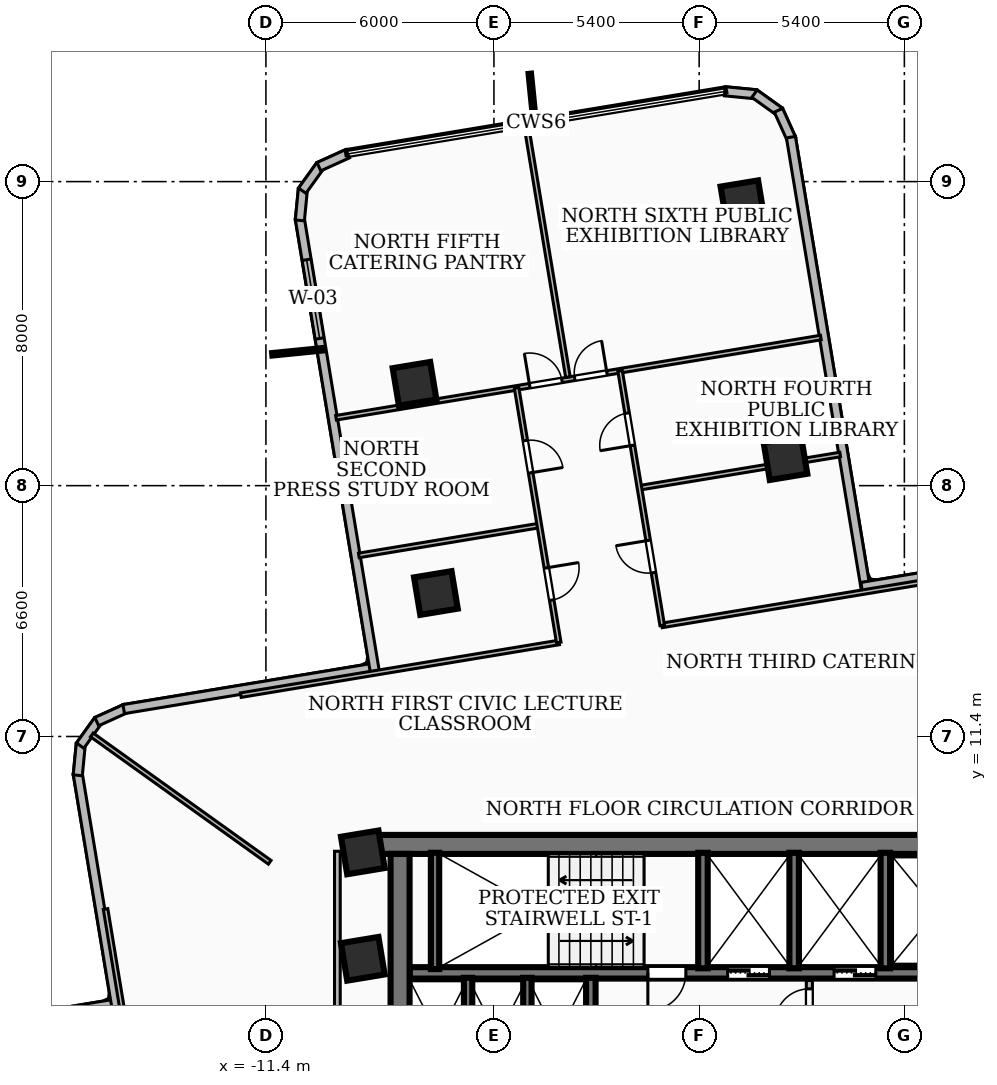
"""IFC4 building model, lengths in metres.
Left out: names, types, materials, properties, quantities, classifications, styles, units other than length and angle.
Written with IfcOpenShell. Run it as: python <this file> out.ifc"""

import sys

from ifc_helpers import new_model, si_unit, direction, frame, frame_2d, origin, origin_2d, place, context, subcontext, project, spatial, rectangle, extrude, element, fill, save


model = new_model("IFC4")
c1 = context("Model", 3, precision=1e-05, world=origin(), true_north=direction((0.0, 1.0)))
c2 = subcontext(c1, "Body", "Model", "MODEL_VIEW")
j1 = project(units=[si_unit("LENGTHUNIT", "METRE"), si_unit("PLANEANGLEUNIT", "RADIAN")], contexts=[c1])
p1 = place(None, origin())
s1 = spatial("IfcSite", under=j1, at=p1, CompositionType="ELEMENT")
p2 = place(p1, origin())
s2 = spatial("IfcBuilding", under=s1, at=p2, CompositionType="ELEMENT")
p3 = place(p2, frame((0.0, 0.0, 96.48)))
s3 = spatial("IfcBuildingStorey", under=s2, at=p3, CompositionType="ELEMENT", Elevation=96.48)
p4 = place(p3, frame((-8.78, 8.56, 0.0), z_axis=(0.0, 0.0, 1.0), x_axis=(1.0, 0.0, 0.0)))
e1 = element("IfcWall", 1, at=p4, inside=s3, PredefinedType="SHEAR", context=c2, shape_type="SweptSolid", body=[
    extrude(rectangle(XDim=17.56, YDim=0.5, at=frame_2d((8.78, 0.0))), origin(), (0.0, 0.0, 1.0), 3.34),
])
p5 = place(p3, frame((-7.87, 2.0, 0.0), z_axis=(0.0, 0.0, 1.0), x_axis=(0.0, 1.0, 0.0)))
e2 = element("IfcWall", 2, at=p5, inside=s3, PredefinedType="SHEAR", context=c2, shape_type="SweptSolid", body=[
    extrude(rectangle(XDim=6.31, YDim=0.5, at=frame_2d((3.155, 0.0))), origin(), (0.0, 0.0, 1.0), 3.34),
])
p6 = place(p3, frame((7.62, 5.18, 0.0), z_axis=(0.0, 0.0, 1.0), x_axis=(-1.0, 0.0, 0.0)))
e3 = element("IfcWall", 3, at=p6, inside=s3, PredefinedType="SOLIDWALL", context=c2, shape_type="SweptSolid", body=[
    extrude(rectangle(XDim=15.24, YDim=0.3, at=frame_2d((7.62, 0.0))), origin(), (0.0, 0.0, 1.0), 3.34),
])
p7 = place(p6, frame((5.77, 0.0, 0.0)))
e4 = element("IfcOpeningElement", 4, at=p7, cuts=e3, PredefinedType="OPENING", context=c2, shape_type="SweptSolid", body=[
    extrude(rectangle(XDim=1.1, YDim=2.15, at=frame_2d((0.55, 1.075))), frame((0.0, 0.16, 0.0), z_axis=(0.0, -1.0, 0.0), x_axis=(1.0, 0.0, 0.0)), (0.0, 0.0, 1.0), 0.32),
])
p8 = place(p6, frame((2.97, 0.0, 0.0)))
e5 = element("IfcOpeningElement", 5, at=p8, cuts=e3, PredefinedType="OPENING", context=c2, shape_type="SweptSolid", body=[
    extrude(rectangle(XDim=1.1, YDim=2.15, at=frame_2d((0.55, 1.075))), frame((0.0, 0.16, 0.0), z_axis=(0.0, -1.0, 0.0), x_axis=(1.0, 0.0, 0.0)), (0.0, 0.0, 1.0), 0.32),
])
p9 = place(p6, frame((7.97, 0.0, 0.0)))
e6 = element("IfcOpeningElement", 6, at=p9, cuts=e3, PredefinedType="OPENING", context=c2, shape_type="SweptSolid", body=[
    extrude(rectangle(XDim=1.0, YDim=2.1, at=frame_2d((0.5, 1.05))), frame((0.0, 0.16, 0.0), z_axis=(0.0, -1.0, 0.0), x_axis=(1.0, 0.0, 0.0)), (0.0, 0.0, 1.0), 0.32),
])
p10 = place(p3, frame((-6.95, 5.28, 0.0), z_axis=(0.0, 0.0, 1.0), x_axis=(0.0, 1.0, 0.0)))
e7 = element("IfcWall", 7, at=p10, inside=s3, PredefinedType="SOLIDWALL", context=c2, shape_type="SweptSolid", body=[
    extrude(rectangle(XDim=3.06, YDim=0.22, at=frame_2d((1.53, 0.0))), origin(), (0.0, 0.0, 1.0), 3.34),
])
for number, where, z_axis, x_axis in (
    (8, (0.1, 5.3, 0.0), (0.0, 0.0, 1.0), (0.0, 1.0, 0.0)),
    (9, (2.5, 5.3, 0.0), (0.0, 0.0, 1.0), (0.0, 1.0, 0.0)),
    (10, (4.9, 5.3, 0.0), (0.0, 0.0, 1.0), (0.0, 1.0, 0.0)),
):
    element("IfcWall", number, at=place(p3, frame(where, z_axis=z_axis, x_axis=x_axis)), inside=s3, PredefinedType="SOLIDWALL", context=c2, shape_type="SweptSolid", body=[
        extrude(rectangle(XDim=3.04, YDim=0.25, at=frame_2d((1.52, 0.0))), origin(), (0.0, 0.0, 1.0), 3.34),
    ])
p11 = place(p3, frame((-2.85, 1.98, 0.0), z_axis=(0.0, 0.0, 1.0), x_axis=(0.0, 1.0, 0.0)))
e11 = element("IfcWall", 11, at=p11, inside=s3, PredefinedType="SOLIDWALL", context=c2, shape_type="SweptSolid", body=[
    extrude(rectangle(XDim=3.07, YDim=0.25, at=frame_2d((1.535, 0.0))), origin(), (0.0, 0.0, 1.0), 3.34),
])
for number, where, z_axis, x_axis in (
    (12, (-6.08, 1.98, 0.0), (0.0, 0.0, 1.0), (0.0, 1.0, 0.0)),
    (13, (-4.52, 1.98, 0.0), (0.0, 0.0, 1.0), (0.0, 1.0, 0.0)),
):
    element("IfcWall", number, at=place(p3, frame(where, z_axis=z_axis, x_axis=x_axis)), inside=s3, PredefinedType="SOLIDWALL", context=c2, shape_type="SweptSolid", body=[
        extrude(rectangle(XDim=3.07, YDim=0.22, at=frame_2d((1.535, 0.0))), origin(), (0.0, 0.0, 1.0), 3.34),
    ])
for number, where, z_axis, x_axis in (
    (14, (-8.85, 5.55, 0.0), (0.0, 0.0, 1.0), (0.987, 0.163, 0.0)),
    (15, (-8.85, 8.35, 0.0), (0.0, 0.0, 1.0), (0.987, 0.163, 0.0)),
    (16, (2.271, 18.724, 0.0), (0.0, 0.0, 1.0), (0.987, 0.163, 0.0)),
    (17, (-6.927, 15.175, 0.0), (0.0, 0.0, 1.0), (0.987, 0.163, 0.0)),
    (18, (1.139, 25.457, 0.0), (0.0, 0.0, 1.0), (0.987, 0.163, 0.0)),
    (19, (-7.489, 20.679, 0.0), (0.0, 0.0, 1.0), (0.987, 0.163, 0.0)),
):
    element("IfcColumn", number, at=place(p3, frame(where, z_axis=z_axis, x_axis=x_axis)), inside=s3, PredefinedType="COLUMN", context=c2, shape_type="SweptSolid", body=[
        extrude(rectangle(XDim=1.0, YDim=1.0, at=origin_2d()), origin(), (0.0, 0.0, 1.0), 3.6),
    ])
p12 = place(p3, frame((-31.312, 1.729, 0.0), z_axis=(0.0, 0.0, 1.0), x_axis=(0.986572947557, 0.163321214629, 0.0)))
e20 = element("IfcWall", 20, at=p12, inside=s3, PredefinedType="SOLIDWALL", context=c2, shape_type="SweptSolid", body=[
    extrude(rectangle(XDim=16.274, YDim=0.24, at=frame_2d((8.137, 0.0))), origin(), (0.0, 0.0, 1.0), 3.34),
])
p13 = place(p12, frame((1.1, 0.0, 0.85)))
e21 = element("IfcOpeningElement", 21, at=p13, cuts=e20, PredefinedType="OPENING", context=c2, shape_type="SweptSolid", body=[
    extrude(rectangle(XDim=2.1, YDim=1.8, at=frame_2d((1.05, 0.9))), frame((0.0, 0.13, 0.0), z_axis=(0.0, -1.0, 0.0), x_axis=(1.0, 0.0, 0.0)), (0.0, 0.0, 1.0), 0.26),
])
p14 = place(p3, frame((-15.335, 4.276, 0.0), z_axis=(0.0, 0.0, 1.0), x_axis=(-0.16323720082, 0.986586851863, 0.0)))
e22 = element("IfcWall", 22, at=p14, inside=s3, PredefinedType="SOLIDWALL", context=c2, shape_type="SweptSolid", body=[
    extrude(rectangle(XDim=6.237, YDim=0.24, at=frame_2d((3.118, 0.0))), origin(), (0.0, 0.0, 1.0), 3.34),
])
p15 = place(p3, frame((-16.351, 10.379, 0.0), z_axis=(0.0, 0.0, 1.0), x_axis=(0.096474594184, 0.995335447313, 0.0)))
e23 = element("IfcWall", 23, at=p15, inside=s3, PredefinedType="SOLIDWALL", context=c2, shape_type="SweptSolid", body=[
    extrude(rectangle(XDim=0.83, YDim=0.24, at=frame_2d((0.415, 0.0))), origin(), (0.0, 0.0, 1.0), 3.34),
])
p16 = place(p3, frame((-16.288, 11.16, 0.0), z_axis=(0.0, 0.0, 1.0), x_axis=(0.583561896965, 0.812068662375, 0.0)))
e24 = element("IfcWall", 24, at=p16, inside=s3, PredefinedType="SOLIDWALL", context=c2, shape_type="SweptSolid", body=[
    extrude(rectangle(XDim=0.814, YDim=0.24, at=frame_2d((0.407, 0.0))), origin(), (0.0, 0.0, 1.0), 3.34),
])
p17 = place(p3, frame((-15.851, 11.791, 0.0), z_axis=(0.0, 0.0, 1.0), x_axis=(0.910868773958, 0.412696106872, 0.0)))
e25 = element("IfcWall", 25, at=p17, inside=s3, PredefinedType="SOLIDWALL", context=c2, shape_type="SweptSolid", body=[
    extrude(rectangle(XDim=0.831, YDim=0.24, at=frame_2d((0.416, 0.0))), origin(), (0.0, 0.0, 1.0), 3.34),
])
p18 = place(p3, frame((-15.142, 12.12, 0.0), z_axis=(0.0, 0.0, 1.0), x_axis=(0.986586085056, 0.163241835244, 0.0)))
e26 = element("IfcWall", 26, at=p18, inside=s3, PredefinedType="SOLIDWALL", context=c2, shape_type="SweptSolid", body=[
    extrude(rectangle(XDim=6.775, YDim=0.24, at=frame_2d((3.387, 0.0))), origin(), (0.0, 0.0, 1.0), 3.34),
])
p19 = place(p3, frame((-8.537, 13.115, 0.0), z_axis=(0.0, 0.0, 1.0), x_axis=(-0.163290786455, 0.986577984276, 0.0)))
e27 = element("IfcWall", 27, at=p19, inside=s3, PredefinedType="SOLIDWALL", context=c2, shape_type="SweptSolid", body=[
    extrude(rectangle(XDim=12.076, YDim=0.24, at=frame_2d((6.038, 0.0))), origin(), (0.0, 0.0, 1.0), 3.34),
])
p20 = place(p19, frame((8.876, 0.0, 0.85)))
e28 = element("IfcOpeningElement", 28, at=p20, cuts=e27, PredefinedType="OPENING", context=c2, shape_type="SweptSolid", body=[
    extrude(rectangle(XDim=2.1, YDim=2.0, at=frame_2d((1.05, 1.0))), frame((0.0, 0.13, 0.0), z_axis=(0.0, -1.0, 0.0), x_axis=(1.0, 0.0, 0.0)), (0.0, 0.0, 1.0), 0.26),
])
p21 = place(p3, frame((-10.507, 24.979, 0.0), z_axis=(0.0, 0.0, 1.0), x_axis=(0.096389937095, 0.995343649212, 0.0)))
e29 = element("IfcWall", 29, at=p21, inside=s3, PredefinedType="SOLIDWALL", context=c2, shape_type="SweptSolid", body=[
    extrude(rectangle(XDim=0.831, YDim=0.24, at=frame_2d((0.416, 0.0))), origin(), (0.0, 0.0, 1.0), 3.34),
])
p22 = place(p3, frame((-10.444, 25.761, 0.0), z_axis=(0.0, 0.0, 1.0), x_axis=(0.583561896965, 0.812068662375, 0.0)))
e30 = element("IfcWall", 30, at=p22, inside=s3, PredefinedType="SOLIDWALL", context=c2, shape_type="SweptSolid", body=[
    extrude(rectangle(XDim=0.814, YDim=0.24, at=frame_2d((0.407, 0.0))), origin(), (0.0, 0.0, 1.0), 3.34),
])
p23 = place(p3, frame((-10.007, 26.392, 0.0), z_axis=(0.0, 0.0, 1.0), x_axis=(0.91142038271, 0.41147647075, 0.0)))
e31 = element("IfcWall", 31, at=p23, inside=s3, PredefinedType="SOLIDWALL", context=c2, shape_type="SweptSolid", body=[
    extrude(rectangle(XDim=0.831, YDim=0.24, at=frame_2d((0.415, 0.0))), origin(), (0.0, 0.0, 1.0), 3.34),
])
p24 = place(p3, frame((0.674, 28.377, 0.0), z_axis=(0.0, 0.0, 1.0), x_axis=(0.99537180181, -0.096098783346, 0.0)))
e32 = element("IfcWall", 32, at=p24, inside=s3, PredefinedType="SOLIDWALL", context=c2, shape_type="SweptSolid", body=[
    extrude(rectangle(XDim=0.831, YDim=0.24, at=frame_2d((0.416, 0.0))), origin(), (0.0, 0.0, 1.0), 3.34),
])
p25 = place(p3, frame((1.456, 28.314, 0.0), z_axis=(0.0, 0.0, 1.0), x_axis=(0.812108665246, -0.583506226045, 0.0)))
e33 = element("IfcWall", 33, at=p25, inside=s3, PredefinedType="SOLIDWALL", context=c2, shape_type="SweptSolid", body=[
    extrude(rectangle(XDim=0.814, YDim=0.24, at=frame_2d((0.407, 0.0))), origin(), (0.0, 0.0, 1.0), 3.34),
])
p26 = place(p3, frame((2.087, 27.877, 0.0), z_axis=(0.0, 0.0, 1.0), x_axis=(0.412272558088, -0.91106055663, 0.0)))
e34 = element("IfcWall", 34, at=p26, inside=s3, PredefinedType="SOLIDWALL", context=c2, shape_type="SweptSolid", body=[
    extrude(rectangle(XDim=0.83, YDim=0.24, at=frame_2d((0.415, 0.0))), origin(), (0.0, 0.0, 1.0), 3.34),
])
p27 = place(p3, frame((2.415, 27.169, 0.0), z_axis=(0.0, 0.0, 1.0), x_axis=(0.163307072567, -0.986575288587, 0.0)))
e35 = element("IfcWall", 35, at=p27, inside=s3, PredefinedType="SOLIDWALL", context=c2, shape_type="SweptSolid", body=[
    extrude(rectangle(XDim=12.075, YDim=0.24, at=frame_2d((6.038, 0.0))), origin(), (0.0, 0.0, 1.0), 2.486),
])
p28 = place(p3, frame((4.276, 15.335, 0.0), z_axis=(0.0, 0.0, 1.0), x_axis=(0.986586851863, 0.16323720082, 0.0)))
e36 = element("IfcWall", 36, at=p28, inside=s3, PredefinedType="SOLIDWALL", context=c2, shape_type="SweptSolid", body=[
    extrude(rectangle(XDim=6.237, YDim=0.24, at=frame_2d((3.118, 0.0))), origin(), (0.0, 0.0, 1.0), 2.486),
])
p29 = place(p3, frame((2.9, 2.04, 0.0), z_axis=(0.0, 0.0, 1.0), x_axis=(0.0, 1.0, 0.0)))
e37 = element("IfcWall", 37, at=p29, inside=s3, PredefinedType="PARTITIONING", context=c2, shape_type="SweptSolid", body=[
    extrude(rectangle(XDim=2.94, YDim=0.16, at=frame_2d((1.47, 0.0))), origin(), (0.0, 0.0, 1.0), 2.405),
])
p30 = place(p29, frame((1.82, 0.0, 0.0)))
e38 = element("IfcOpeningElement", 38, at=p30, cuts=e37, PredefinedType="OPENING", context=c2, shape_type="SweptSolid", body=[
    extrude(rectangle(XDim=0.9, YDim=2.06, at=frame_2d((0.45, 1.03))), frame((0.0, 0.09, 0.0), z_axis=(0.0, -1.0, 0.0), x_axis=(1.0, 0.0, 0.0)), (0.0, 0.0, 1.0), 0.18),
])
p31 = place(p3, frame((-9.52, 1.75, 0.0), z_axis=(0.0, 0.0, 1.0), x_axis=(0.0, 1.0, 0.0)))
e39 = element("IfcWall", 39, at=p31, inside=s3, PredefinedType="PARTITIONING", context=c2, shape_type="SweptSolid", body=[
    extrude(rectangle(XDim=6.63, YDim=0.15, at=frame_2d((3.315, 0.0))), origin(), (0.0, 0.0, 1.0), 2.486),
])
p32 = place(p3, frame((-11.3, 8.09, 0.0), z_axis=(0.0, 0.0, 1.0), x_axis=(-0.813131268368, 0.582080355623, 0.0)))
e40 = element("IfcWall", 40, at=p32, inside=s3, PredefinedType="PARTITIONING", context=c2, shape_type="SweptSolid", body=[
    extrude(rectangle(XDim=5.757, YDim=0.12, at=frame_2d((2.878, 0.0))), origin(), (0.0, 0.0, 1.0), 3.34),
])
p33 = place(p3, frame((-3.686, 13.874, 0.0), z_axis=(0.0, 0.0, 1.0), x_axis=(-0.98658138377, -0.163270245909, 0.0)))
e41 = element("IfcWall", 41, at=p33, inside=s3, PredefinedType="PARTITIONING", context=c2, shape_type="SweptSolid", body=[
    extrude(rectangle(XDim=8.489, YDim=0.12, at=frame_2d((4.245, 0.0))), origin(), (0.0, 0.0, 1.0), 2.486),
])
p34 = place(p3, frame((6.86, 15.62, 0.0), z_axis=(0.0, 0.0, 1.0), x_axis=(-0.986575116384, -0.16330811288, 0.0)))
e42 = element("IfcWall", 42, at=p34, inside=s3, PredefinedType="PARTITIONING", context=c2, shape_type="SweptSolid", body=[
    extrude(rectangle(XDim=7.949, YDim=0.12, at=frame_2d((3.974, 0.0))), origin(), (0.0, 0.0, 1.0), 2.486),
])
p35 = place(p3, frame((-4.225, 16.948, 0.0), z_axis=(0.0, 0.0, 1.0), x_axis=(-0.986542154764, -0.163507115668, 0.0)))
e43 = element("IfcWall", 43, at=p35, inside=s3, PredefinedType="PARTITIONING", context=c2, shape_type="SweptSolid", body=[
    extrude(rectangle(XDim=4.794, YDim=0.12, at=frame_2d((2.397, 0.0))), origin(), (0.0, 0.0, 1.0), 2.486),
])
p36 = place(p3, frame((3.711, 18.819, 0.0), z_axis=(0.0, 0.0, 1.0), x_axis=(-0.986548097851, -0.163471253213, 0.0)))
e44 = element("IfcWall", 44, at=p36, inside=s3, PredefinedType="PARTITIONING", context=c2, shape_type="SweptSolid", body=[
    extrude(rectangle(XDim=5.335, YDim=0.12, at=frame_2d((2.667, 0.0))), origin(), (0.0, 0.0, 1.0), 2.486),
])
p37 = place(p3, frame((-4.804, 20.572, 0.0), z_axis=(0.0, 0.0, 1.0), x_axis=(0.163308569386, -0.986575040818, 0.0)))
e45 = element("IfcWall", 45, at=p37, inside=s3, PredefinedType="PARTITIONING", context=c2, shape_type="SweptSolid", body=[
    extrude(rectangle(XDim=6.79, YDim=0.12, at=frame_2d((3.395, 0.0))), origin(), (0.0, 0.0, 1.0), 3.34),
])
p38 = place(p37, frame((4.8, 0.0, 0.0)))
e46 = element("IfcOpeningElement", 46, at=p38, cuts=e45, PredefinedType="OPENING", context=c2, shape_type="SweptSolid", body=[
    extrude(rectangle(XDim=0.86, YDim=2.04, at=frame_2d((0.43, 1.02))), frame((0.0, 0.07, 0.0), z_axis=(0.0, -1.0, 0.0), x_axis=(1.0, 0.0, 0.0)), (0.0, 0.0, 1.0), 0.14),
])
p39 = place(p37, frame((1.405, 0.0, 0.0)))
e47 = element("IfcOpeningElement", 47, at=p39, cuts=e45, PredefinedType="OPENING", context=c2, shape_type="SweptSolid", body=[
    extrude(rectangle(XDim=0.86, YDim=2.04, at=frame_2d((0.43, 1.02))), frame((0.0, 0.07, 0.0), z_axis=(0.0, -1.0, 0.0), x_axis=(1.0, 0.0, 0.0)), (0.0, 0.0, 1.0), 0.14),
])
p40 = place(p3, frame((-0.972, 14.324, 0.0), z_axis=(0.0, 0.0, 1.0), x_axis=(-0.163366745174, 0.98656540917, 0.0)))
e48 = element("IfcWall", 48, at=p40, inside=s3, PredefinedType="PARTITIONING", context=c2, shape_type="SweptSolid", body=[
    extrude(rectangle(XDim=6.789, YDim=0.12, at=frame_2d((3.395, 0.0))), origin(), (0.0, 0.0, 1.0), 3.34),
])
p41 = place(p40, frame((1.405, 0.0, 0.0)))
e49 = element("IfcOpeningElement", 49, at=p41, cuts=e48, PredefinedType="OPENING", context=c2, shape_type="SweptSolid", body=[
    extrude(rectangle(XDim=0.86, YDim=2.04, at=frame_2d((0.43, 1.02))), frame((0.0, 0.07, 0.0), z_axis=(0.0, -1.0, 0.0), x_axis=(1.0, 0.0, 0.0)), (0.0, 0.0, 1.0), 0.14),
])
p42 = place(p40, frame((4.8, 0.0, 0.0)))
e50 = element("IfcOpeningElement", 50, at=p42, cuts=e48, PredefinedType="OPENING", context=c2, shape_type="SweptSolid", body=[
    extrude(rectangle(XDim=0.86, YDim=2.04, at=frame_2d((0.43, 1.02))), frame((0.0, 0.07, 0.0), z_axis=(0.0, -1.0, 0.0), x_axis=(1.0, 0.0, 0.0)), (0.0, 0.0, 1.0), 0.14),
])
p43 = place(p3, frame((-3.453, 20.856, 0.0), z_axis=(0.0, 0.0, 1.0), x_axis=(-0.163346014225, 0.986568841813, 0.0)))
e51 = element("IfcWall", 51, at=p43, inside=s3, PredefinedType="PARTITIONING", context=c2, shape_type="SweptSolid", body=[
    extrude(rectangle(XDim=6.656, YDim=0.12, at=frame_2d((3.328, 0.0))), origin(), (0.0, 0.0, 1.0), 2.832),
])
p44 = place(p3, frame((-9.555, 19.786, 0.0), z_axis=(0.0, 0.0, 1.0), x_axis=(0.98658208559, 0.163266005016, 0.0)))
e52 = element("IfcWall", 52, at=p44, inside=s3, PredefinedType="PARTITIONING", context=c2, shape_type="SweptSolid", body=[
    extrude(rectangle(XDim=12.93, YDim=0.12, at=frame_2d((6.465, 0.0))), origin(), (0.0, 0.0, 1.0), 2.486),
])
p45 = place(p44, frame((6.365, 0.0, 0.0)))
e53 = element("IfcOpeningElement", 53, at=p45, cuts=e52, PredefinedType="OPENING", context=c2, shape_type="SweptSolid", body=[
    extrude(rectangle(XDim=0.86, YDim=2.04, at=frame_2d((0.43, 1.02))), frame((0.0, 0.07, 0.0), z_axis=(0.0, -1.0, 0.0), x_axis=(1.0, 0.0, 0.0)), (0.0, 0.0, 1.0), 0.14),
])
p46 = place(p44, frame((5.165, 0.0, 0.0)))
e54 = element("IfcOpeningElement", 54, at=p46, cuts=e52, PredefinedType="OPENING", context=c2, shape_type="SweptSolid", body=[
    extrude(rectangle(XDim=0.86, YDim=2.04, at=frame_2d((0.43, 1.02))), frame((0.0, 0.07, 0.0), z_axis=(0.0, -1.0, 0.0), x_axis=(1.0, 0.0, 0.0)), (0.0, 0.0, 1.0), 0.14),
])
p47 = place(p3, frame((-15.62, 6.86, 0.0), z_axis=(0.0, 0.0, 1.0), x_axis=(0.16330811288, -0.986575116384, 0.0)))
e55 = element("IfcWall", 55, at=p47, inside=s3, PredefinedType="PARTITIONING", context=c2, shape_type="SweptSolid", body=[
    extrude(rectangle(XDim=7.949, YDim=0.12, at=frame_2d((3.974, 0.0))), origin(), (0.0, 0.0, 1.0), 2.486),
])
p48 = place(p20, origin())
e56 = element("IfcWindow", 56, at=p48, inside=s3, PartitioningType="SINGLE_PANEL", PredefinedType="WINDOW", context=c2, shape_type="SweptSolid", body=[
    extrude(rectangle(XDim=2.1, YDim=2.0, at=frame_2d((1.05, 1.0))), frame((0.0, 0.03, 0.0), z_axis=(0.0, -1.0, 0.0), x_axis=(1.0, 0.0, 0.0)), (0.0, 0.0, 1.0), 0.06),
])
fill(e28, e56)
p49 = place(p7, origin())
e57 = element("IfcDoor", 57, at=p49, inside=s3, OperationType="DOUBLE_DOOR_SLIDING", PredefinedType="DOOR", context=c2, shape_type="SweptSolid", body=[
    extrude(rectangle(XDim=1.1, YDim=2.15, at=frame_2d((0.55, 1.075))), frame((0.0, 0.025, 0.0), z_axis=(0.0, -1.0, 0.0), x_axis=(1.0, 0.0, 0.0)), (0.0, 0.0, 1.0), 0.05),
])
fill(e4, e57)
p50 = place(p8, origin())
e58 = element("IfcDoor", 58, at=p50, inside=s3, OperationType="DOUBLE_DOOR_SLIDING", PredefinedType="DOOR", context=c2, shape_type="SweptSolid", body=[
    extrude(rectangle(XDim=1.1, YDim=2.15, at=frame_2d((0.55, 1.075))), frame((0.0, 0.025, 0.0), z_axis=(0.0, -1.0, 0.0), x_axis=(1.0, 0.0, 0.0)), (0.0, 0.0, 1.0), 0.05),
])
fill(e5, e58)
p51 = place(p9, origin())
e59 = element("IfcDoor", 59, at=p51, inside=s3, OperationType="SINGLE_SWING_RIGHT", PredefinedType="DOOR", context=c2, shape_type="SweptSolid", body=[
    extrude(rectangle(XDim=1.0, YDim=2.1, at=frame_2d((0.5, 1.05))), frame((0.0, 0.025, 0.0), z_axis=(0.0, -1.0, 0.0), x_axis=(1.0, 0.0, 0.0)), (0.0, 0.0, 1.0), 0.05),
])
fill(e6, e59)
p52 = place(p30, origin())
e60 = element("IfcDoor", 60, at=p52, inside=s3, OperationType="SINGLE_SWING_LEFT", PredefinedType="DOOR", context=c2, shape_type="SweptSolid", body=[
    extrude(rectangle(XDim=0.9, YDim=2.06, at=frame_2d((0.45, 1.03))), frame((0.0, 0.025, 0.0), z_axis=(0.0, -1.0, 0.0), x_axis=(1.0, 0.0, 0.0)), (0.0, 0.0, 1.0), 0.05),
])
fill(e38, e60)
p53 = place(p38, origin())
e61 = element("IfcDoor", 61, at=p53, inside=s3, OperationType="SINGLE_SWING_LEFT", PredefinedType="DOOR", context=c2, shape_type="SweptSolid", body=[
    extrude(rectangle(XDim=0.86, YDim=2.04, at=frame_2d((0.43, 1.02))), frame((0.0, 0.025, 0.0), z_axis=(0.0, -1.0, 0.0), x_axis=(1.0, 0.0, 0.0)), (0.0, 0.0, 1.0), 0.05),
])
fill(e46, e61)
p54 = place(p39, origin())
e62 = element("IfcDoor", 62, at=p54, inside=s3, OperationType="SINGLE_SWING_RIGHT", PredefinedType="DOOR", context=c2, shape_type="SweptSolid", body=[
    extrude(rectangle(XDim=0.86, YDim=2.04, at=frame_2d((0.43, 1.02))), frame((0.0, 0.025, 0.0), z_axis=(0.0, -1.0, 0.0), x_axis=(1.0, 0.0, 0.0)), (0.0, 0.0, 1.0), 0.05),
])
fill(e47, e62)
p55 = place(p41, origin())
e63 = element("IfcDoor", 63, at=p55, inside=s3, OperationType="SINGLE_SWING_RIGHT", PredefinedType="DOOR", context=c2, shape_type="SweptSolid", body=[
    extrude(rectangle(XDim=0.86, YDim=2.04, at=frame_2d((0.43, 1.02))), frame((0.0, 0.025, 0.0), z_axis=(0.0, -1.0, 0.0), x_axis=(1.0, 0.0, 0.0)), (0.0, 0.0, 1.0), 0.05),
])
fill(e49, e63)
p56 = place(p42, origin())
e64 = element("IfcDoor", 64, at=p56, inside=s3, OperationType="SINGLE_SWING_LEFT", PredefinedType="DOOR", context=c2, shape_type="SweptSolid", body=[
    extrude(rectangle(XDim=0.86, YDim=2.04, at=frame_2d((0.43, 1.02))), frame((0.0, 0.025, 0.0), z_axis=(0.0, -1.0, 0.0), x_axis=(1.0, 0.0, 0.0)), (0.0, 0.0, 1.0), 0.05),
])
fill(e50, e64)
p57 = place(p45, origin())
e65 = element("IfcDoor", 65, at=p57, inside=s3, OperationType="SINGLE_SWING_RIGHT", PredefinedType="DOOR", context=c2, shape_type="SweptSolid", body=[
    extrude(rectangle(XDim=0.86, YDim=2.04, at=frame_2d((0.43, 1.02))), frame((0.0, 0.025, 0.0), z_axis=(0.0, -1.0, 0.0), x_axis=(1.0, 0.0, 0.0)), (0.0, 0.0, 1.0), 0.05),
])
fill(e53, e65)
p58 = place(p46, origin())
e66 = element("IfcDoor", 66, at=p58, inside=s3, OperationType="SINGLE_SWING_LEFT", PredefinedType="DOOR", context=c2, shape_type="SweptSolid", body=[
    extrude(rectangle(XDim=0.86, YDim=2.04, at=frame_2d((0.43, 1.02))), frame((0.0, 0.025, 0.0), z_axis=(0.0, -1.0, 0.0), x_axis=(1.0, 0.0, 0.0)), (0.0, 0.0, 1.0), 0.05),
])
fill(e54, e66)
save(model, sys.argv[1])
